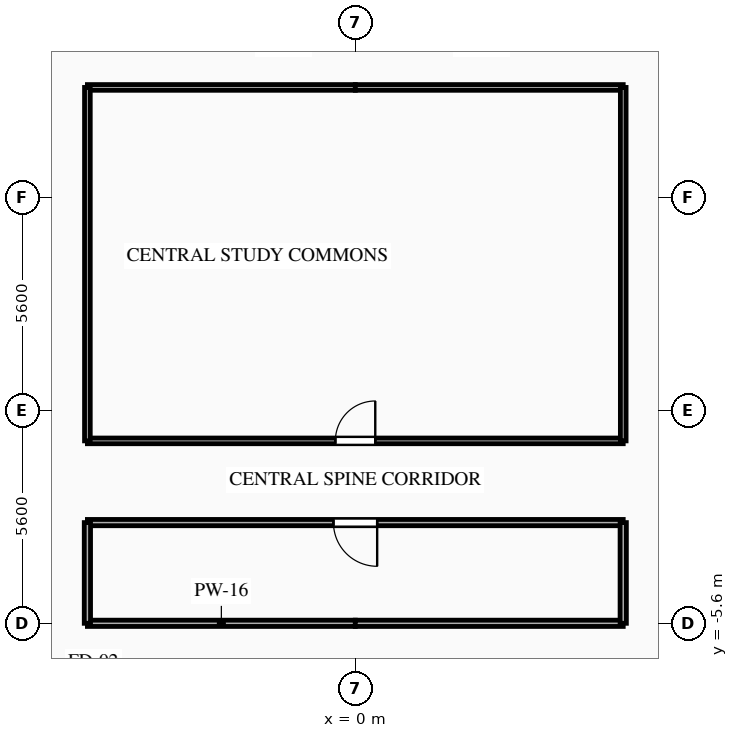
"""IFC4 building model, lengths in metres.
Left out: names, types, materials, properties, quantities, classifications, styles, units other than length and angle.
Written with IfcOpenShell. Run it as: python <this file> out.ifc"""

import sys

from ifc_helpers import new_model, si_unit, direction, frame, frame_2d, origin, place, context, subcontext, project, spatial, rectangle, extrude, element, fill, save


model = new_model("IFC4")
c1 = context("Model", 3, precision=1e-05, world=origin(), true_north=direction((0.0, 1.0)))
c2 = subcontext(c1, "Body", "Model", "MODEL_VIEW")
j1 = project(units=[si_unit("LENGTHUNIT", "METRE"), si_unit("PLANEANGLEUNIT", "RADIAN")], contexts=[c1])
p1 = place(None, origin())
s1 = spatial("IfcSite", under=j1, at=p1, CompositionType="ELEMENT")
p2 = place(p1, origin())
s2 = spatial("IfcBuilding", under=s1, at=p2, CompositionType="ELEMENT")
p3 = place(p2, frame((0.0, 0.0, 161.15)))
s3 = spatial("IfcBuildingStorey", under=s2, at=p3, CompositionType="ELEMENT", Elevation=161.15)
for number, where, z_axis, x_axis in (
    (1, (0.0, 8.5, 0.0), (0.0, 0.0, 1.0), (-1.0, 0.0, 0.0)),
    (2, (7.05, 8.5, 0.0), (0.0, 0.0, 1.0), (-1.0, 0.0, 0.0)),
):
    element("IfcWall", number, at=place(p3, frame(where, z_axis=z_axis, x_axis=x_axis)), inside=s3, PredefinedType="PARTITIONING", context=c2, shape_type="SweptSolid", body=[
        extrude(rectangle(XDim=7.05, YDim=0.15, at=frame_2d((3.525, 0.0))), origin(), (0.0, 0.0, 1.0), 3.04),
    ])
for number, where, z_axis, x_axis in (
    (3, (-7.05, -5.6, 0.0), (0.0, 0.0, 1.0), (1.0, 0.0, 0.0)),
    (4, (0.0, -5.6, 0.0), (0.0, 0.0, 1.0), (1.0, 0.0, 0.0)),
):
    element("IfcWall", number, at=place(p3, frame(where, z_axis=z_axis, x_axis=x_axis)), inside=s3, PredefinedType="PARTITIONING", context=c2, shape_type="SweptSolid", body=[
        extrude(rectangle(XDim=7.05, YDim=0.165, at=frame_2d((3.525, 0.0))), origin(), (0.0, 0.0, 1.0), 2.525),
    ])
p4 = place(p3, frame((-7.05, -0.8, 0.0), z_axis=(0.0, 0.0, 1.0), x_axis=(1.0, 0.0, 0.0)))
e5 = element("IfcWall", 5, at=p4, inside=s3, PredefinedType="PARTITIONING", context=c2, shape_type="SweptSolid", body=[
    extrude(rectangle(XDim=14.1, YDim=0.15, at=frame_2d((7.05, 0.0))), origin(), (0.0, 0.0, 1.0), 3.04),
])
p5 = place(p4, frame((6.525, 0.0, 0.0)))
e6 = element("IfcOpeningElement", 6, at=p5, cuts=e5, PredefinedType="OPENING", context=c2, shape_type="SweptSolid", body=[
    extrude(rectangle(XDim=1.05, YDim=2.15, at=frame_2d((0.525, 1.075))), frame((0.0, 0.085, 0.0), z_axis=(0.0, -1.0, 0.0), x_axis=(1.0, 0.0, 0.0)), (0.0, 0.0, 1.0), 0.17),
])
p6 = place(p3, frame((7.05, -2.95, 0.0), z_axis=(0.0, 0.0, 1.0), x_axis=(-1.0, 0.0, 0.0)))
e7 = element("IfcWall", 7, at=p6, inside=s3, PredefinedType="PARTITIONING", context=c2, shape_type="SweptSolid", body=[
    extrude(rectangle(XDim=14.1, YDim=0.165, at=frame_2d((7.05, 0.0))), origin(), (0.0, 0.0, 1.0), 3.04),
])
p7 = place(p6, frame((6.475, 0.0, 0.0)))
e8 = element("IfcOpeningElement", 8, at=p7, cuts=e7, PredefinedType="OPENING", context=c2, shape_type="SweptSolid", body=[
    extrude(rectangle(XDim=1.15, YDim=2.15, at=frame_2d((0.575, 1.075))), frame((0.0, 0.093, 0.0), z_axis=(0.0, -1.0, 0.0), x_axis=(1.0, 0.0, 0.0)), (0.0, 0.0, 1.0), 0.185),
])
p8 = place(p3, frame((-7.05, 8.5, 0.0), z_axis=(0.0, 0.0, 1.0), x_axis=(0.0, -1.0, 0.0)))
e9 = element("IfcWall", 9, at=p8, inside=s3, PredefinedType="PARTITIONING", context=c2, shape_type="SweptSolid", body=[
    extrude(rectangle(XDim=9.3, YDim=0.15, at=frame_2d((4.65, 0.0))), origin(), (0.0, 0.0, 1.0), 3.04),
])
p9 = place(p3, frame((-7.05, -2.95, 0.0), z_axis=(0.0, 0.0, 1.0), x_axis=(0.0, -1.0, 0.0)))
e10 = element("IfcWall", 10, at=p9, inside=s3, PredefinedType="PARTITIONING", context=c2, shape_type="SweptSolid", body=[
    extrude(rectangle(XDim=2.65, YDim=0.165, at=frame_2d((1.325, 0.0))), origin(), (0.0, 0.0, 1.0), 3.04),
])
p10 = place(p3, frame((7.05, -0.8, 0.0), z_axis=(0.0, 0.0, 1.0), x_axis=(0.0, 1.0, 0.0)))
e11 = element("IfcWall", 11, at=p10, inside=s3, PredefinedType="PARTITIONING", context=c2, shape_type="SweptSolid", body=[
    extrude(rectangle(XDim=9.3, YDim=0.15, at=frame_2d((4.65, 0.0))), origin(), (0.0, 0.0, 1.0), 3.04),
])
p11 = place(p3, frame((7.05, -5.6, 0.0), z_axis=(0.0, 0.0, 1.0), x_axis=(0.0, 1.0, 0.0)))
e12 = element("IfcWall", 12, at=p11, inside=s3, PredefinedType="PARTITIONING", context=c2, shape_type="SweptSolid", body=[
    extrude(rectangle(XDim=2.65, YDim=0.165, at=frame_2d((1.325, 0.0))), origin(), (0.0, 0.0, 1.0), 3.04),
])
p12 = place(p5, origin())
e13 = element("IfcDoor", 13, at=p12, inside=s3, OperationType="SINGLE_SWING_RIGHT", PredefinedType="DOOR", context=c2, shape_type="SweptSolid", body=[
    extrude(rectangle(XDim=1.05, YDim=2.15, at=frame_2d((0.525, 1.075))), frame((0.0, 0.025, 0.0), z_axis=(0.0, -1.0, 0.0), x_axis=(1.0, 0.0, 0.0)), (0.0, 0.0, 1.0), 0.05),
])
fill(e6, e13)
p13 = place(p7, origin())
e14 = element("IfcDoor", 14, at=p13, inside=s3, OperationType="SINGLE_SWING_LEFT", PredefinedType="DOOR", context=c2, shape_type="SweptSolid", body=[
    extrude(rectangle(XDim=1.15, YDim=2.15, at=frame_2d((0.575, 1.075))), frame((0.0, 0.025, 0.0), z_axis=(0.0, -1.0, 0.0), x_axis=(1.0, 0.0, 0.0)), (0.0, 0.0, 1.0), 0.05),
])
fill(e8, e14)
save(model, sys.argv[1])
